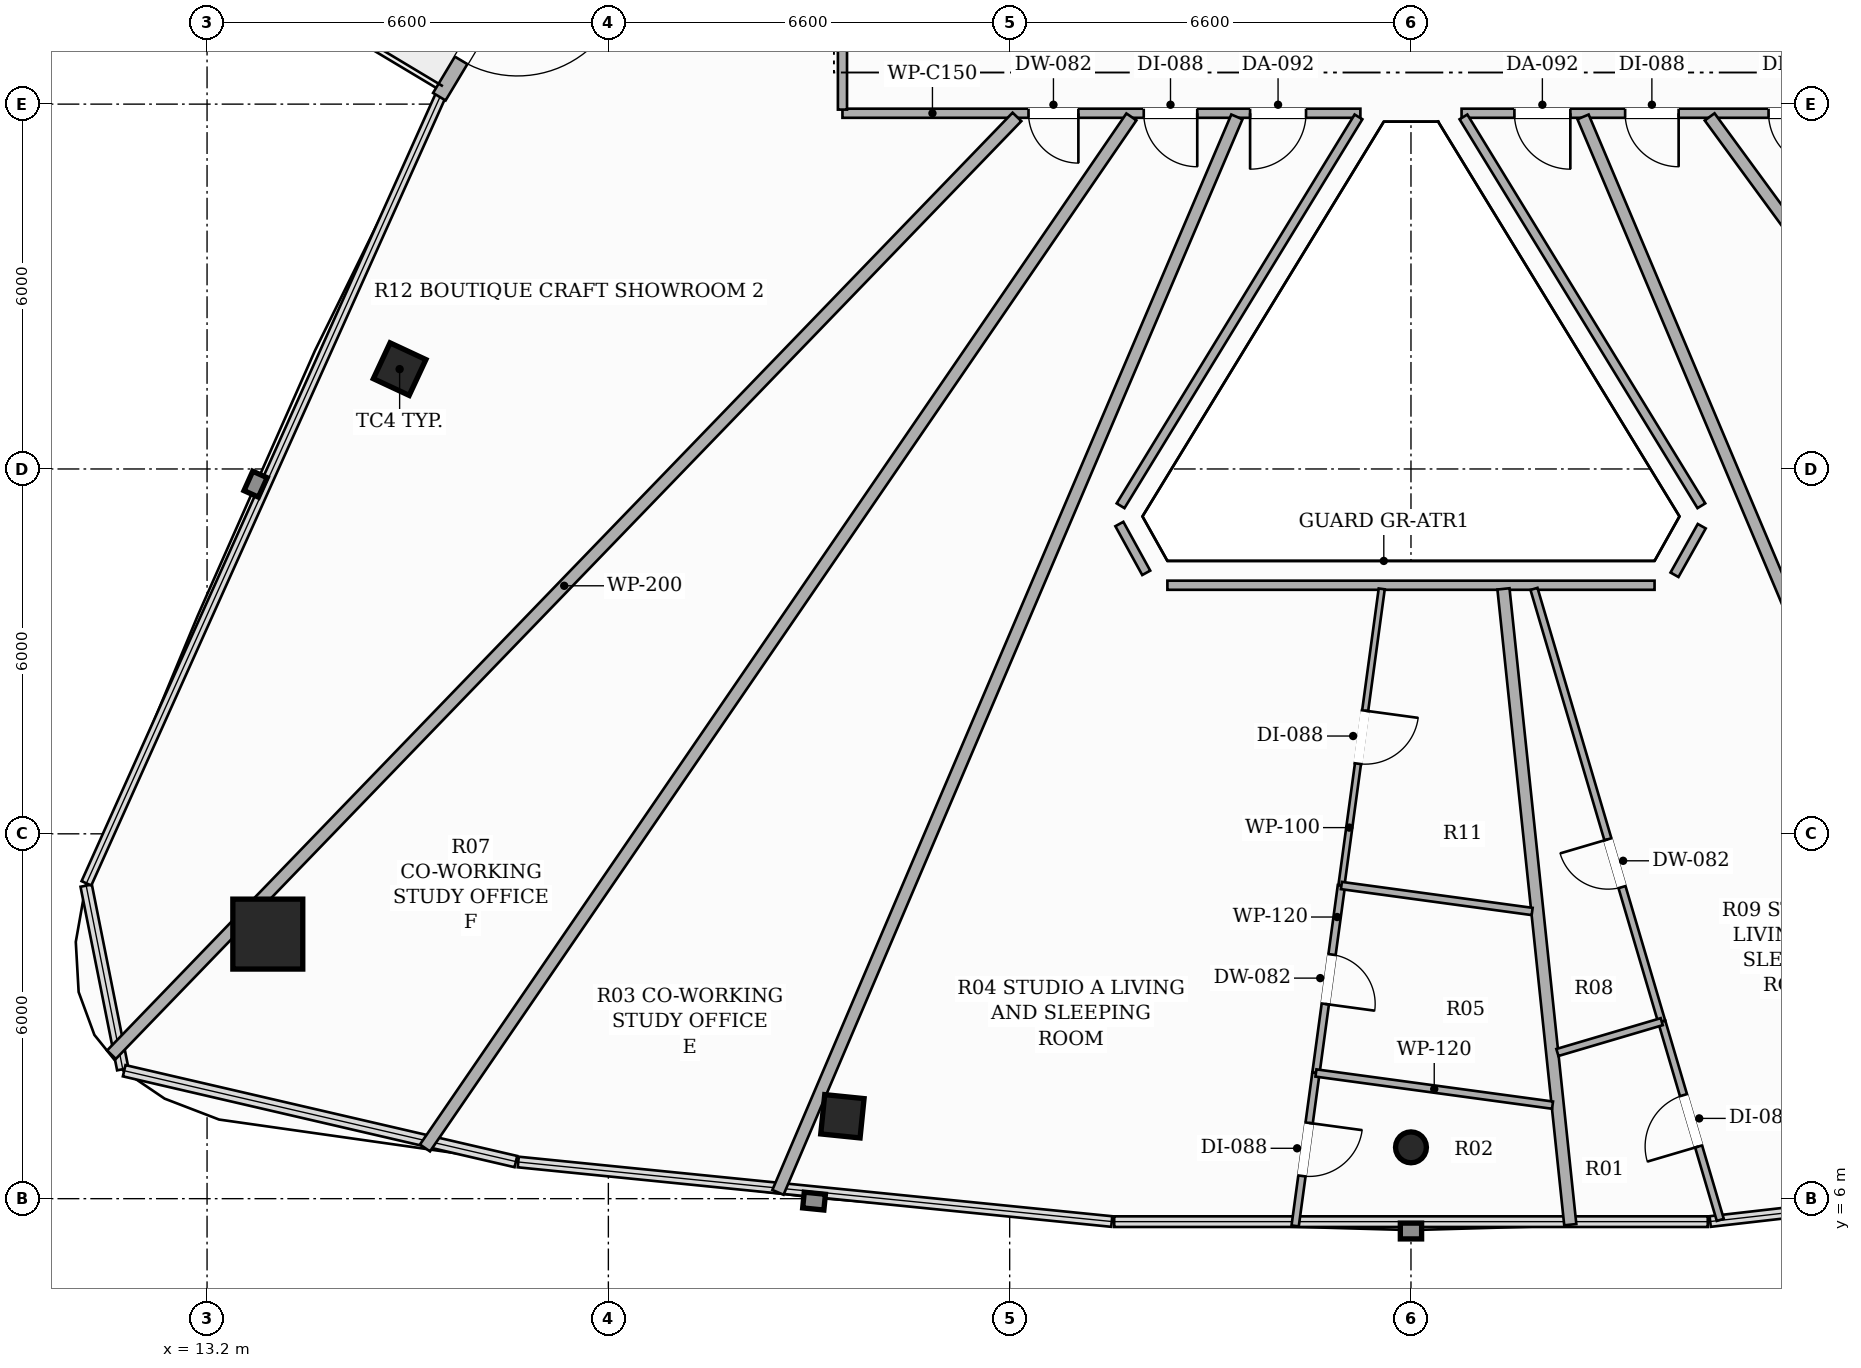
"""IFC4 building model, lengths in metres.
Left out: names, types, materials, properties, quantities, classifications, styles, units other than length and angle.
Written with IfcOpenShell. Run it as: python <this file> out.ifc"""

import sys

from ifc_helpers import new_model, si_unit, direction, frame, frame_2d, origin, origin_2d, place, context, subcontext, project, spatial, rectangle, hollow_rectangle, hollow_circle, extrude, element, fill, save


model = new_model("IFC4")
c1 = context("Model", 3, precision=1e-05, world=origin(), true_north=direction((0.0, 1.0)))
c2 = subcontext(c1, "Body", "Model", "MODEL_VIEW")
j1 = project(units=[si_unit("LENGTHUNIT", "METRE"), si_unit("PLANEANGLEUNIT", "RADIAN")], contexts=[c1])
p1 = place(None, origin())
s1 = spatial("IfcSite", under=j1, at=p1, CompositionType="ELEMENT")
p2 = place(p1, origin())
s2 = spatial("IfcBuilding", under=s1, at=p2, CompositionType="ELEMENT")
p3 = place(p2, frame((0.0, 0.0, 263.45)))
s3 = spatial("IfcBuildingStorey", under=s2, at=p3, CompositionType="ELEMENT", Elevation=263.45)
p4 = place(p3, frame((14.199, 10.351, 0.0), z_axis=(0.0, 0.0, 1.0), x_axis=(1.0, 0.0, 0.0)))
e1 = element("IfcColumn", 1, at=p4, inside=s3, PredefinedType="COLUMN", context=c2, shape_type="SweptSolid", body=[
    extrude(hollow_rectangle(XDim=1.15, YDim=1.15, WallThickness=0.036, at=origin_2d()), origin(), (0.0, 0.0, 1.0), 3.3),
])
for number, where, z_axis, x_axis in (
    (2, (16.367, 19.642, 0.0), (0.0, 0.0, 1.0), (0.423, 0.906, 0.0)),
    (3, (23.649, 7.355, 0.0), (0.0, 0.0, 1.0), (-0.995, 0.101, 0.0)),
):
    element("IfcColumn", number, at=place(p3, frame(where, z_axis=z_axis, x_axis=x_axis)), inside=s3, PredefinedType="COLUMN", context=c2, shape_type="SweptSolid", body=[
        extrude(hollow_rectangle(XDim=0.65, YDim=0.65, WallThickness=0.022, at=origin_2d()), origin(), (0.0, 0.0, 1.0), 3.3),
    ])
p5 = place(p3, frame((33.0, 6.844, 0.0), z_axis=(0.0, 0.0, 1.0), x_axis=(1.0, 0.0, 0.0)))
e4 = element("IfcColumn", 4, at=p5, inside=s3, PredefinedType="COLUMN", context=c2, shape_type="SweptSolid", body=[
    extrude(hollow_circle(Radius=0.254, WallThickness=0.016, at=origin_2d()), origin(), (0.0, 0.0, 1.0), 3.3),
])
p6 = place(p3, frame((21.988, 32.405, 0.0), z_axis=(0.0, 0.0, 1.0), x_axis=(-0.514361929684, -0.857573206958, 0.0)))
e5 = element("IfcWall", 5, at=p6, inside=s3, PredefinedType="SOLIDWALL", context=c2, shape_type="SweptSolid", body=[
    extrude(rectangle(XDim=9.659, YDim=0.24, at=frame_2d((4.829, 0.0))), origin(), (0.0, 0.0, 1.0), 2.624),
])
p7 = place(p6, frame((7.162, 0.0, 0.0)))
e6 = element("IfcOpeningElement", 6, at=p7, cuts=e5, PredefinedType="OPENING", context=c2, shape_type="SweptSolid", body=[
    extrude(rectangle(XDim=1.8, YDim=2.2, at=frame_2d((0.9, 1.1))), frame((0.0, 0.13, 0.0), z_axis=(0.0, -1.0, 0.0), x_axis=(1.0, 0.0, 0.0)), (0.0, 0.0, 1.0), 0.26),
])
p8 = place(p3, frame((32.168, 23.85, 0.0), z_axis=(0.0, 0.0, 1.0), x_axis=(-1.0, 0.0, 0.0)))
e7 = element("IfcWall", 7, at=p8, inside=s3, PredefinedType="PARTITIONING", context=c2, shape_type="SweptSolid", body=[
    extrude(rectangle(XDim=8.518, YDim=0.15, at=frame_2d((4.259, 0.0))), origin(), (0.0, 0.0, 1.0), 2.565),
])
p9 = place(p8, frame((0.894, 0.0, 0.0)))
e8 = element("IfcOpeningElement", 8, at=p9, cuts=e7, PredefinedType="OPENING", context=c2, shape_type="SweptSolid", body=[
    extrude(rectangle(XDim=0.92, YDim=2.15, at=frame_2d((0.46, 1.075))), frame((0.0, 0.085, 0.0), z_axis=(0.0, -1.0, 0.0), x_axis=(1.0, 0.0, 0.0)), (0.0, 0.0, 1.0), 0.17),
])
p10 = place(p8, frame((2.683, 0.0, 0.0)))
e9 = element("IfcOpeningElement", 9, at=p10, cuts=e7, PredefinedType="OPENING", context=c2, shape_type="SweptSolid", body=[
    extrude(rectangle(XDim=0.88, YDim=2.1, at=frame_2d((0.44, 1.05))), frame((0.0, 0.085, 0.0), z_axis=(0.0, -1.0, 0.0), x_axis=(1.0, 0.0, 0.0)), (0.0, 0.0, 1.0), 0.17),
])
p11 = place(p8, frame((4.638, 0.0, 0.0)))
e10 = element("IfcOpeningElement", 10, at=p11, cuts=e7, PredefinedType="OPENING", context=c2, shape_type="SweptSolid", body=[
    extrude(rectangle(XDim=0.82, YDim=2.1, at=frame_2d((0.41, 1.05))), frame((0.0, 0.085, 0.0), z_axis=(0.0, -1.0, 0.0), x_axis=(1.0, 0.0, 0.0)), (0.0, 0.0, 1.0), 0.17),
])
p12 = place(p3, frame((23.65, 23.91, 0.0), z_axis=(0.0, 0.0, 1.0), x_axis=(0.0, 1.0, 0.0)))
e11 = element("IfcWall", 11, at=p12, inside=s3, PredefinedType="PARTITIONING", context=c2, shape_type="SweptSolid", body=[
    extrude(rectangle(XDim=10.784, YDim=0.15, at=frame_2d((5.392, 0.0))), origin(), (0.0, 0.0, 1.0), 2.492),
])
p13 = place(p12, frame((4.952, 0.0, 0.0)))
e12 = element("IfcOpeningElement", 12, at=p13, cuts=e11, PredefinedType="OPENING", context=c2, shape_type="SweptSolid", body=[
    extrude(rectangle(XDim=0.88, YDim=2.1, at=frame_2d((0.44, 1.05))), frame((0.0, 0.085, 0.0), z_axis=(0.0, -1.0, 0.0), x_axis=(1.0, 0.0, 0.0)), (0.0, 0.0, 1.0), 0.17),
])
p14 = place(p3, frame((42.19, 23.85, 0.0), z_axis=(0.0, 0.0, 1.0), x_axis=(-1.0, 0.0, 0.0)))
e13 = element("IfcWall", 13, at=p14, inside=s3, PredefinedType="PARTITIONING", context=c2, shape_type="SweptSolid", body=[
    extrude(rectangle(XDim=8.358, YDim=0.15, at=frame_2d((4.179, 0.0))), origin(), (0.0, 0.0, 1.0), 2.565),
])
p15 = place(p14, frame((2.429, 0.0, 0.0)))
e14 = element("IfcOpeningElement", 14, at=p15, cuts=e13, PredefinedType="OPENING", context=c2, shape_type="SweptSolid", body=[
    extrude(rectangle(XDim=0.88, YDim=2.1, at=frame_2d((0.44, 1.05))), frame((0.0, 0.085, 0.0), z_axis=(0.0, -1.0, 0.0), x_axis=(1.0, 0.0, 0.0)), (0.0, 0.0, 1.0), 0.17),
])
p16 = place(p14, frame((4.788, 0.0, 0.0)))
e15 = element("IfcOpeningElement", 15, at=p16, cuts=e13, PredefinedType="OPENING", context=c2, shape_type="SweptSolid", body=[
    extrude(rectangle(XDim=0.88, YDim=2.1, at=frame_2d((0.44, 1.05))), frame((0.0, 0.085, 0.0), z_axis=(0.0, -1.0, 0.0), x_axis=(1.0, 0.0, 0.0)), (0.0, 0.0, 1.0), 0.17),
])
p17 = place(p14, frame((6.569, 0.0, 0.0)))
e16 = element("IfcOpeningElement", 16, at=p17, cuts=e13, PredefinedType="OPENING", context=c2, shape_type="SweptSolid", body=[
    extrude(rectangle(XDim=0.92, YDim=2.15, at=frame_2d((0.46, 1.075))), frame((0.0, 0.085, 0.0), z_axis=(0.0, -1.0, 0.0), x_axis=(1.0, 0.0, 0.0)), (0.0, 0.0, 1.0), 0.17),
])
p18 = place(p3, frame((33.863, 23.79, 0.0), z_axis=(0.0, 0.0, 1.0), x_axis=(0.521913594497, -0.852998358661, 0.0)))
e17 = element("IfcWall", 17, at=p18, inside=s3, PredefinedType="PARTITIONING", context=c2, shape_type="SweptSolid", body=[
    extrude(rectangle(XDim=7.497, YDim=0.15, at=frame_2d((3.749, 0.0))), origin(), (0.0, 0.0, 1.0), 2.773),
])
p19 = place(p3, frame((37.782, 17.059, 0.0), z_axis=(0.0, 0.0, 1.0), x_axis=(-0.489033415255, -0.872265050752, 0.0)))
e18 = element("IfcWall", 18, at=p19, inside=s3, PredefinedType="PARTITIONING", context=c2, shape_type="SweptSolid", body=[
    extrude(rectangle(XDim=0.916, YDim=0.15, at=frame_2d((0.458, 0.0))), origin(), (0.0, 0.0, 1.0), 3.06),
])
p20 = place(p3, frame((37.006, 16.088, 0.0), z_axis=(0.0, 0.0, 1.0), x_axis=(-1.0, 0.0, 0.0)))
e19 = element("IfcWall", 19, at=p20, inside=s3, PredefinedType="PARTITIONING", context=c2, shape_type="SweptSolid", body=[
    extrude(rectangle(XDim=8.012, YDim=0.15, at=frame_2d((4.006, 0.0))), origin(), (0.0, 0.0, 1.0), 2.773),
])
p21 = place(p3, frame((28.646, 16.292, 0.0), z_axis=(0.0, 0.0, 1.0), x_axis=(-0.482133469033, 0.876097778811, 0.0)))
e20 = element("IfcWall", 20, at=p21, inside=s3, PredefinedType="PARTITIONING", context=c2, shape_type="SweptSolid", body=[
    extrude(rectangle(XDim=0.917, YDim=0.15, at=frame_2d((0.458, 0.0))), origin(), (0.0, 0.0, 1.0), 3.06),
])
p22 = place(p3, frame((28.224, 17.395, 0.0), z_axis=(0.0, 0.0, 1.0), x_axis=(0.521913594497, 0.852998358661, 0.0)))
e21 = element("IfcWall", 21, at=p22, inside=s3, PredefinedType="PARTITIONING", context=c2, shape_type="SweptSolid", body=[
    extrude(rectangle(XDim=7.497, YDim=0.15, at=frame_2d((3.749, 0.0))), origin(), (0.0, 0.0, 1.0), 2.773),
])
p23 = place(p3, frame((26.52, 23.79, 0.0), z_axis=(0.0, 0.0, 1.0), x_axis=(-0.694637190704, -0.719360252788, 0.0)))
e22 = element("IfcWall", 22, at=p23, inside=s3, PredefinedType="PARTITIONING", context=c2, shape_type="SweptSolid", body=[
    extrude(rectangle(XDim=21.439, YDim=0.2, at=frame_2d((10.719, 0.0))), origin(), (0.0, 0.0, 1.0), 2.492),
])
p24 = place(p3, frame((34.521, 16.028, 0.0), z_axis=(0.0, 0.0, 1.0), x_axis=(0.104542147599, -0.994520456992, 0.0)))
e23 = element("IfcWall", 23, at=p24, inside=s3, PredefinedType="PARTITIONING", context=c2, shape_type="SweptSolid", body=[
    extrude(rectangle(XDim=10.514, YDim=0.2, at=frame_2d((5.257, 0.0))), origin(), (0.0, 0.0, 1.0), 2.492),
])
p25 = place(p3, frame((22.589, 6.104, 0.0), z_axis=(0.0, 0.0, 1.0), x_axis=(0.392518309842, 0.919744190761, 0.0)))
e24 = element("IfcWall", 24, at=p25, inside=s3, PredefinedType="PARTITIONING", context=c2, shape_type="SweptSolid", body=[
    extrude(rectangle(XDim=19.229, YDim=0.2, at=frame_2d((9.615, 0.0))), origin(), (0.0, 0.0, 1.0), 2.492),
])
p26 = place(p3, frame((50.22, 6.976, 0.0), z_axis=(0.0, 0.0, 1.0), x_axis=(-0.59066502199, 0.80691686796, 0.0)))
e25 = element("IfcWall", 25, at=p26, inside=s3, PredefinedType="PARTITIONING", context=c2, shape_type="SweptSolid", body=[
    extrude(rectangle(XDim=20.837, YDim=0.2, at=frame_2d((10.419, 0.0))), origin(), (0.0, 0.0, 1.0), 2.492),
])
p27 = place(p3, frame((43.296, 6.09, 0.0), z_axis=(0.0, 0.0, 1.0), x_axis=(-0.388640997534, 0.921389263578, 0.0)))
e26 = element("IfcWall", 26, at=p27, inside=s3, PredefinedType="PARTITIONING", context=c2, shape_type="SweptSolid", body=[
    extrude(rectangle(XDim=19.21, YDim=0.2, at=frame_2d((9.605, 0.0))), origin(), (0.0, 0.0, 1.0), 2.492),
])
p28 = place(p3, frame((16.784, 6.834, 0.0), z_axis=(0.0, 0.0, 1.0), x_axis=(0.565235631435, 0.824929500598, 0.0)))
e27 = element("IfcWall", 27, at=p28, inside=s3, PredefinedType="PARTITIONING", context=c2, shape_type="SweptSolid", body=[
    extrude(rectangle(XDim=20.554, YDim=0.2, at=frame_2d((10.277, 0.0))), origin(), (0.0, 0.0, 1.0), 2.492),
])
p29 = place(p3, frame((31.856, 11.15, 0.0), z_axis=(0.0, 0.0, 1.0), x_axis=(-0.134650977284, -0.990893089246, 0.0)))
e28 = element("IfcWall", 28, at=p29, inside=s3, PredefinedType="PARTITIONING", context=c2, shape_type="SweptSolid", body=[
    extrude(rectangle(XDim=3.111, YDim=0.12, at=frame_2d((1.556, 0.0))), origin(), (0.0, 0.0, 1.0), 3.06),
])
p30 = place(p29, frame((1.146, 0.0, 0.0)))
e29 = element("IfcOpeningElement", 29, at=p30, cuts=e28, PredefinedType="OPENING", context=c2, shape_type="SweptSolid", body=[
    extrude(rectangle(XDim=0.82, YDim=2.1, at=frame_2d((0.41, 1.05))), frame((0.0, 0.07, 0.0), z_axis=(0.0, -1.0, 0.0), x_axis=(1.0, 0.0, 0.0)), (0.0, 0.0, 1.0), 0.14),
])
p31 = place(p3, frame((31.437, 8.067, 0.0), z_axis=(0.0, 0.0, 1.0), x_axis=(-0.134765499074, -0.990877520312, 0.0)))
e30 = element("IfcWall", 30, at=p31, inside=s3, PredefinedType="PARTITIONING", context=c2, shape_type="SweptSolid", body=[
    extrude(rectangle(XDim=2.538, YDim=0.12, at=frame_2d((1.269, 0.0))), origin(), (0.0, 0.0, 1.0), 2.492),
])
p32 = place(p31, frame((0.829, 0.0, 0.0)))
e31 = element("IfcOpeningElement", 31, at=p32, cuts=e30, PredefinedType="OPENING", context=c2, shape_type="SweptSolid", body=[
    extrude(rectangle(XDim=0.88, YDim=2.1, at=frame_2d((0.44, 1.05))), frame((0.0, 0.07, 0.0), z_axis=(0.0, -1.0, 0.0), x_axis=(1.0, 0.0, 0.0)), (0.0, 0.0, 1.0), 0.14),
])
p33 = place(p3, frame((32.519, 16.028, 0.0), z_axis=(0.0, 0.0, 1.0), x_axis=(-0.134690507908, -0.990887716686, 0.0)))
e32 = element("IfcWall", 32, at=p33, inside=s3, PredefinedType="PARTITIONING", context=c2, shape_type="SweptSolid", body=[
    extrude(rectangle(XDim=4.923, YDim=0.1, at=frame_2d((2.461, 0.0))), origin(), (0.0, 0.0, 1.0), 3.06),
])
p34 = place(p33, frame((2.021, 0.0, 0.0)))
e33 = element("IfcOpeningElement", 33, at=p34, cuts=e32, PredefinedType="OPENING", context=c2, shape_type="SweptSolid", body=[
    extrude(rectangle(XDim=0.88, YDim=2.1, at=frame_2d((0.44, 1.05))), frame((0.0, 0.06, 0.0), z_axis=(0.0, -1.0, 0.0), x_axis=(1.0, 0.0, 0.0)), (0.0, 0.0, 1.0), 0.12),
])
p35 = place(p3, frame((35.328, 7.538, 0.0), z_axis=(0.0, 0.0, 1.0), x_axis=(-0.990890227425, 0.134672035678, 0.0)))
e34 = element("IfcWall", 34, at=p35, inside=s3, PredefinedType="PARTITIONING", context=c2, shape_type="SweptSolid", body=[
    extrude(rectangle(XDim=3.927, YDim=0.12, at=frame_2d((1.963, 0.0))), origin(), (0.0, 0.0, 1.0), 2.773),
])
p36 = place(p3, frame((31.856, 11.15, 0.0), z_axis=(0.0, 0.0, 1.0), x_axis=(0.990862518896, -0.13487575263, 0.0)))
e35 = element("IfcWall", 35, at=p36, inside=s3, PredefinedType="PARTITIONING", context=c2, shape_type="SweptSolid", body=[
    extrude(rectangle(XDim=3.166, YDim=0.12, at=frame_2d((1.583, 0.0))), origin(), (0.0, 0.0, 1.0), 2.773),
])
p37 = place(p3, frame((37.124, 8.911, 0.0), z_axis=(0.0, 0.0, 1.0), x_axis=(-0.283131577199, 0.959081075818, 0.0)))
e36 = element("IfcWall", 36, at=p37, inside=s3, PredefinedType="PARTITIONING", context=c2, shape_type="SweptSolid", body=[
    extrude(rectangle(XDim=7.421, YDim=0.12, at=frame_2d((3.71, 0.0))), origin(), (0.0, 0.0, 1.0), 2.773),
])
p38 = place(p37, frame((2.307, 0.0, 0.0)))
e37 = element("IfcOpeningElement", 37, at=p38, cuts=e36, PredefinedType="OPENING", context=c2, shape_type="SweptSolid", body=[
    extrude(rectangle(XDim=0.82, YDim=2.1, at=frame_2d((0.41, 1.05))), frame((0.0, 0.07, 0.0), z_axis=(0.0, -1.0, 0.0), x_axis=(1.0, 0.0, 0.0)), (0.0, 0.0, 1.0), 0.14),
])
p39 = place(p3, frame((38.087, 5.651, 0.0), z_axis=(0.0, 0.0, 1.0), x_axis=(-0.28300230386, 0.959119229299, 0.0)))
e38 = element("IfcWall", 38, at=p39, inside=s3, PredefinedType="PARTITIONING", context=c2, shape_type="SweptSolid", body=[
    extrude(rectangle(XDim=3.399, YDim=0.12, at=frame_2d((1.699, 0.0))), origin(), (0.0, 0.0, 1.0), 2.492),
])
p40 = place(p39, frame((1.259, 0.0, 0.0)))
e39 = element("IfcOpeningElement", 39, at=p40, cuts=e38, PredefinedType="OPENING", context=c2, shape_type="SweptSolid", body=[
    extrude(rectangle(XDim=0.88, YDim=2.1, at=frame_2d((0.44, 1.05))), frame((0.0, 0.07, 0.0), z_axis=(0.0, -1.0, 0.0), x_axis=(1.0, 0.0, 0.0)), (0.0, 0.0, 1.0), 0.14),
])
p41 = place(p3, frame((37.124, 8.911, 0.0), z_axis=(0.0, 0.0, 1.0), x_axis=(-0.959045510231, -0.283252024362, 0.0)))
e40 = element("IfcWall", 40, at=p41, inside=s3, PredefinedType="PARTITIONING", context=c2, shape_type="SweptSolid", body=[
    extrude(rectangle(XDim=1.789, YDim=0.12, at=frame_2d((0.895, 0.0))), origin(), (0.0, 0.0, 1.0), 3.06),
])
p42 = place(p7, origin())
e41 = element("IfcDoor", 41, at=p42, inside=s3, OperationType="SINGLE_SWING_LEFT", PredefinedType="DOOR", context=c2, shape_type="SweptSolid", body=[
    extrude(rectangle(XDim=1.8, YDim=2.2, at=frame_2d((0.9, 1.1))), frame((0.0, 0.025, 0.0), z_axis=(0.0, -1.0, 0.0), x_axis=(1.0, 0.0, 0.0)), (0.0, 0.0, 1.0), 0.05),
])
fill(e6, e41)
p43 = place(p9, origin())
e42 = element("IfcDoor", 42, at=p43, inside=s3, OperationType="SINGLE_SWING_RIGHT", PredefinedType="DOOR", context=c2, shape_type="SweptSolid", body=[
    extrude(rectangle(XDim=0.92, YDim=2.15, at=frame_2d((0.46, 1.075))), frame((0.0, 0.025, 0.0), z_axis=(0.0, -1.0, 0.0), x_axis=(1.0, 0.0, 0.0)), (0.0, 0.0, 1.0), 0.05),
])
fill(e8, e42)
p44 = place(p30, origin())
e43 = element("IfcDoor", 43, at=p44, inside=s3, OperationType="SINGLE_SWING_RIGHT", PredefinedType="DOOR", context=c2, shape_type="SweptSolid", body=[
    extrude(rectangle(XDim=0.82, YDim=2.1, at=frame_2d((0.41, 1.05))), frame((0.0, 0.025, 0.0), z_axis=(0.0, -1.0, 0.0), x_axis=(1.0, 0.0, 0.0)), (0.0, 0.0, 1.0), 0.05),
])
fill(e29, e43)
p45 = place(p32, origin())
e44 = element("IfcDoor", 44, at=p45, inside=s3, OperationType="SINGLE_SWING_LEFT", PredefinedType="DOOR", context=c2, shape_type="SweptSolid", body=[
    extrude(rectangle(XDim=0.88, YDim=2.1, at=frame_2d((0.44, 1.05))), frame((0.0, 0.025, 0.0), z_axis=(0.0, -1.0, 0.0), x_axis=(1.0, 0.0, 0.0)), (0.0, 0.0, 1.0), 0.05),
])
fill(e31, e44)
p46 = place(p34, origin())
e45 = element("IfcDoor", 45, at=p46, inside=s3, OperationType="SINGLE_SWING_LEFT", PredefinedType="DOOR", context=c2, shape_type="SweptSolid", body=[
    extrude(rectangle(XDim=0.88, YDim=2.1, at=frame_2d((0.44, 1.05))), frame((0.0, 0.025, 0.0), z_axis=(0.0, -1.0, 0.0), x_axis=(1.0, 0.0, 0.0)), (0.0, 0.0, 1.0), 0.05),
])
fill(e33, e45)
p47 = place(p15, origin())
e46 = element("IfcDoor", 46, at=p47, inside=s3, OperationType="SINGLE_SWING_LEFT", PredefinedType="DOOR", context=c2, shape_type="SweptSolid", body=[
    extrude(rectangle(XDim=0.88, YDim=2.1, at=frame_2d((0.44, 1.05))), frame((0.0, 0.025, 0.0), z_axis=(0.0, -1.0, 0.0), x_axis=(1.0, 0.0, 0.0)), (0.0, 0.0, 1.0), 0.05),
])
fill(e14, e46)
p48 = place(p16, origin())
e47 = element("IfcDoor", 47, at=p48, inside=s3, OperationType="SINGLE_SWING_LEFT", PredefinedType="DOOR", context=c2, shape_type="SweptSolid", body=[
    extrude(rectangle(XDim=0.88, YDim=2.1, at=frame_2d((0.44, 1.05))), frame((0.0, 0.025, 0.0), z_axis=(0.0, -1.0, 0.0), x_axis=(1.0, 0.0, 0.0)), (0.0, 0.0, 1.0), 0.05),
])
fill(e15, e47)
p49 = place(p17, origin())
e48 = element("IfcDoor", 48, at=p49, inside=s3, OperationType="SINGLE_SWING_LEFT", PredefinedType="DOOR", context=c2, shape_type="SweptSolid", body=[
    extrude(rectangle(XDim=0.92, YDim=2.15, at=frame_2d((0.46, 1.075))), frame((0.0, 0.025, 0.0), z_axis=(0.0, -1.0, 0.0), x_axis=(1.0, 0.0, 0.0)), (0.0, 0.0, 1.0), 0.05),
])
fill(e16, e48)
p50 = place(p38, origin())
e49 = element("IfcDoor", 49, at=p50, inside=s3, OperationType="SINGLE_SWING_RIGHT", PredefinedType="DOOR", context=c2, shape_type="SweptSolid", body=[
    extrude(rectangle(XDim=0.82, YDim=2.1, at=frame_2d((0.41, 1.05))), frame((0.0, 0.025, 0.0), z_axis=(0.0, -1.0, 0.0), x_axis=(1.0, 0.0, 0.0)), (0.0, 0.0, 1.0), 0.05),
])
fill(e37, e49)
p51 = place(p40, origin())
e50 = element("IfcDoor", 50, at=p51, inside=s3, OperationType="SINGLE_SWING_LEFT", PredefinedType="DOOR", context=c2, shape_type="SweptSolid", body=[
    extrude(rectangle(XDim=0.88, YDim=2.1, at=frame_2d((0.44, 1.05))), frame((0.0, 0.025, 0.0), z_axis=(0.0, -1.0, 0.0), x_axis=(1.0, 0.0, 0.0)), (0.0, 0.0, 1.0), 0.05),
])
fill(e39, e50)
p52 = place(p10, origin())
e51 = element("IfcDoor", 51, at=p52, inside=s3, OperationType="SINGLE_SWING_LEFT", PredefinedType="DOOR", context=c2, shape_type="SweptSolid", body=[
    extrude(rectangle(XDim=0.88, YDim=2.1, at=frame_2d((0.44, 1.05))), frame((0.0, 0.025, 0.0), z_axis=(0.0, -1.0, 0.0), x_axis=(1.0, 0.0, 0.0)), (0.0, 0.0, 1.0), 0.05),
])
fill(e9, e51)
p53 = place(p11, origin())
e52 = element("IfcDoor", 52, at=p53, inside=s3, OperationType="SINGLE_SWING_LEFT", PredefinedType="DOOR", context=c2, shape_type="SweptSolid", body=[
    extrude(rectangle(XDim=0.82, YDim=2.1, at=frame_2d((0.41, 1.05))), frame((0.0, 0.025, 0.0), z_axis=(0.0, -1.0, 0.0), x_axis=(1.0, 0.0, 0.0)), (0.0, 0.0, 1.0), 0.05),
])
fill(e10, e52)
save(model, sys.argv[1])
